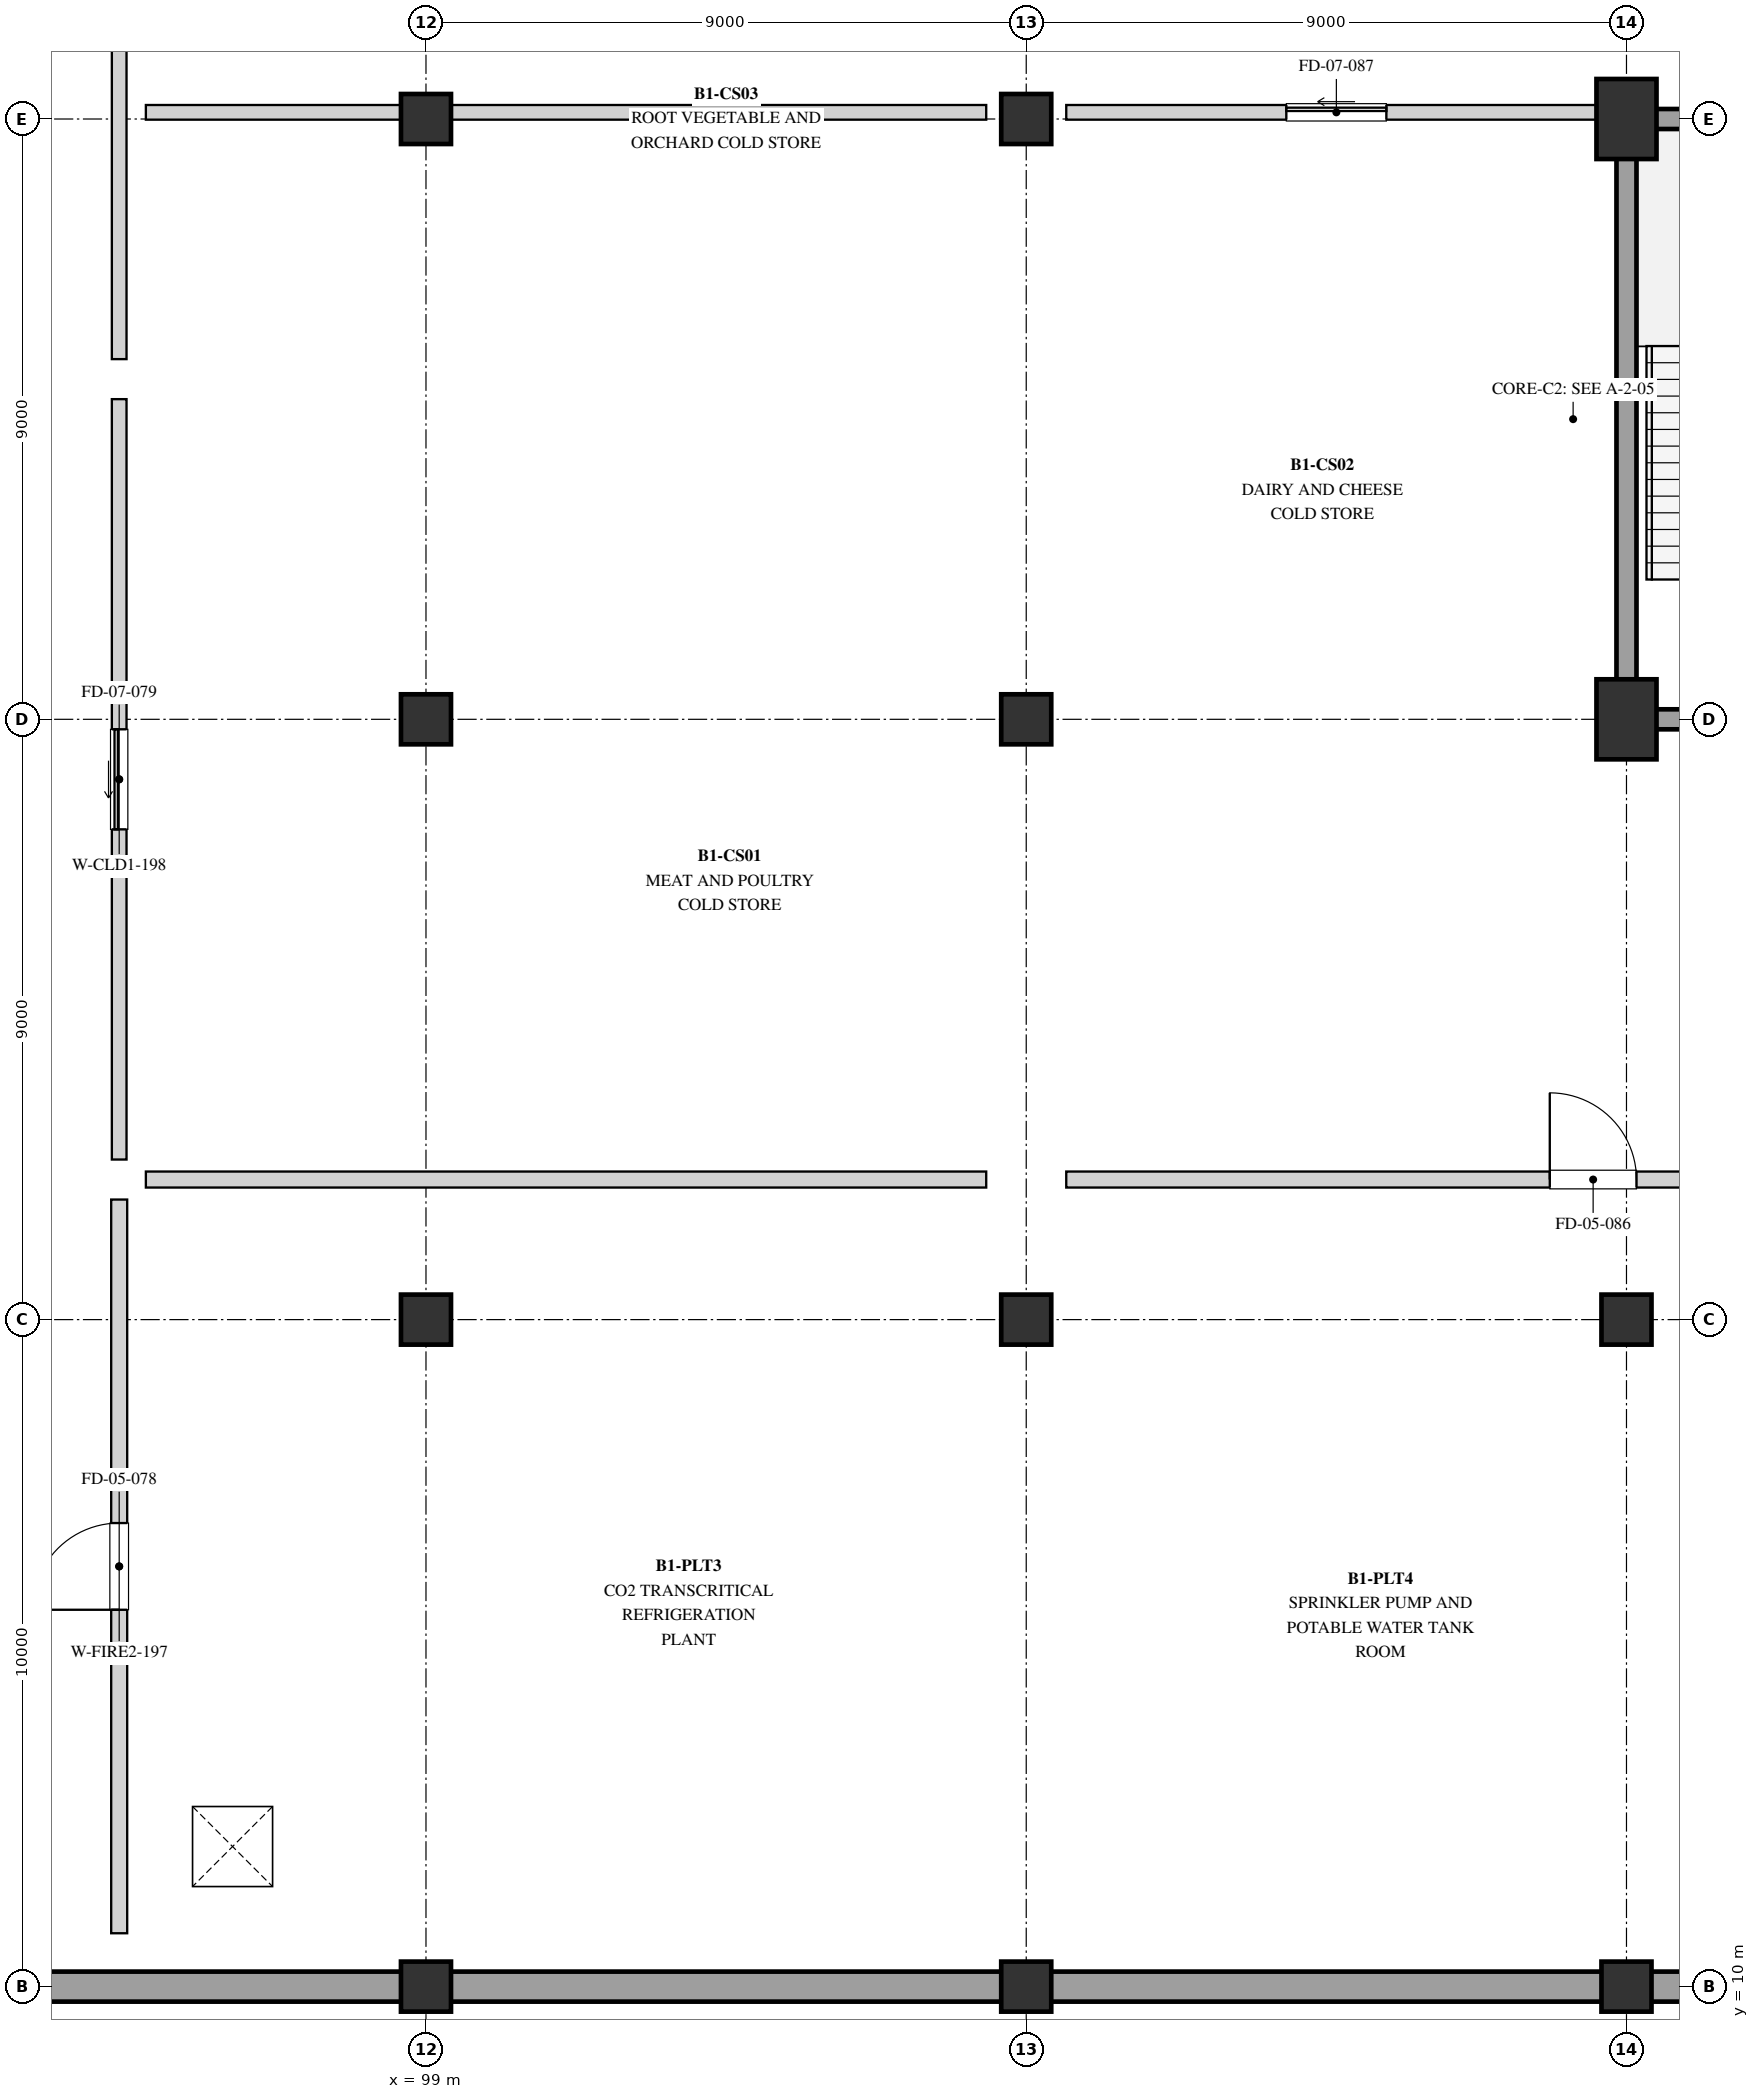
"""IFC4 building model, lengths in metres.
Left out: names, types, materials, properties, quantities, classifications, styles, units other than length and angle.
Written with IfcOpenShell. Run it as: python <this file> out.ifc"""

import sys

from ifc_helpers import new_model, si_unit, direction, frame, frame_2d, origin, origin_2d, place, context, subcontext, project, spatial, rectangle, extrude, element, fill, save


model = new_model("IFC4")
c1 = context("Model", 3, precision=1e-05, world=origin(), true_north=direction((0.0, 1.0)))
c2 = subcontext(c1, "Body", "Model", "MODEL_VIEW")
j1 = project(units=[si_unit("LENGTHUNIT", "METRE"), si_unit("PLANEANGLEUNIT", "RADIAN")], contexts=[c1])
p1 = place(None, origin())
s1 = spatial("IfcSite", under=j1, at=p1, CompositionType="ELEMENT")
p2 = place(p1, origin())
s2 = spatial("IfcBuilding", under=s1, at=p2, CompositionType="ELEMENT")
p3 = place(p2, frame((0.0, 0.0, -4.2)))
s3 = spatial("IfcBuildingStorey", under=s2, at=p3, CompositionType="ELEMENT", Elevation=-4.2)
for number, where, z_axis, x_axis in (
    (1, (99.0, 10.0, 0.0), (0.0, 0.0, 1.0), (1.0, 0.0, 0.0)),
    (2, (99.0, 20.0, 0.0), (0.0, 0.0, 1.0), (1.0, 0.0, 0.0)),
    (3, (99.0, 29.0, 0.0), (0.0, 0.0, 1.0), (1.0, 0.0, 0.0)),
):
    element("IfcColumn", number, at=place(p3, frame(where, z_axis=z_axis, x_axis=x_axis)), inside=s3, PredefinedType="COLUMN", context=c2, shape_type="SweptSolid", body=[
        extrude(rectangle(XDim=0.75, YDim=0.75, at=origin_2d()), origin(), (0.0, 0.0, 1.0), 4.2),
    ])
p4 = place(p3, frame((99.0, 38.0, 0.0), z_axis=(0.0, 0.0, 1.0), x_axis=(1.0, 0.0, 0.0)))
e4 = element("IfcColumn", 4, at=p4, inside=s3, PredefinedType="COLUMN", context=c2, shape_type="SweptSolid", body=[
    extrude(rectangle(XDim=0.75, YDim=0.75, at=origin_2d()), origin(), (0.0, 0.0, 1.0), 3.86),
])
for number, where, z_axis, x_axis in (
    (5, (108.0, 10.0, 0.0), (0.0, 0.0, 1.0), (1.0, 0.0, 0.0)),
    (6, (108.0, 20.0, 0.0), (0.0, 0.0, 1.0), (1.0, 0.0, 0.0)),
    (7, (108.0, 29.0, 0.0), (0.0, 0.0, 1.0), (1.0, 0.0, 0.0)),
    (8, (108.0, 38.0, 0.0), (0.0, 0.0, 1.0), (1.0, 0.0, 0.0)),
    (9, (117.0, 10.0, 0.0), (0.0, 0.0, 1.0), (1.0, 0.0, 0.0)),
    (10, (117.0, 20.0, 0.0), (0.0, 0.0, 1.0), (1.0, 0.0, 0.0)),
):
    element("IfcColumn", number, at=place(p3, frame(where, z_axis=z_axis, x_axis=x_axis)), inside=s3, PredefinedType="COLUMN", context=c2, shape_type="SweptSolid", body=[
        extrude(rectangle(XDim=0.75, YDim=0.75, at=origin_2d()), origin(), (0.0, 0.0, 1.0), 4.2),
    ])
for number, where, z_axis, x_axis in (
    (11, (117.0, 29.0, 0.0), (0.0, 0.0, 1.0), (1.0, 0.0, 0.0)),
    (12, (117.0, 38.0, 0.0), (0.0, 0.0, 1.0), (1.0, 0.0, 0.0)),
):
    element("IfcColumn", number, at=place(p3, frame(where, z_axis=z_axis, x_axis=x_axis)), inside=s3, PredefinedType="COLUMN", context=c2, shape_type="SweptSolid", body=[
        extrude(rectangle(XDim=0.9, YDim=1.2, at=origin_2d()), origin(), (0.0, 0.0, 1.0), 4.2),
    ])
for number, where, z_axis, x_axis in (
    (13, (90.0, 10.0, 0.0), (0.0, 0.0, 1.0), (1.0, 0.0, 0.0)),
    (14, (99.0, 10.0, 0.0), (0.0, 0.0, 1.0), (1.0, 0.0, 0.0)),
    (15, (108.0, 10.0, 0.0), (0.0, 0.0, 1.0), (1.0, 0.0, 0.0)),
):
    element("IfcWall", number, at=place(p3, frame(where, z_axis=z_axis, x_axis=x_axis)), inside=s3, PredefinedType="USERDEFINED", context=c2, shape_type="SweptSolid", body=[
        extrude(rectangle(XDim=9.0, YDim=0.45, at=frame_2d((4.5, 0.0))), origin(), (0.0, 0.0, 1.0), 3.82),
    ])
p5 = place(p3, frame((117.0, 10.0, 0.0), z_axis=(0.0, 0.0, 1.0), x_axis=(1.0, 0.0, 0.0)))
e16 = element("IfcWall", 16, at=p5, inside=s3, PredefinedType="USERDEFINED", context=c2, shape_type="SweptSolid", body=[
    extrude(rectangle(XDim=8.2, YDim=0.45, at=frame_2d((4.1, 0.0))), origin(), (0.0, 0.0, 1.0), 3.82),
])
p6 = place(p3, frame((117.0, 29.35, 0.0), z_axis=(0.0, 0.0, 1.0), x_axis=(0.0, 1.0, 0.0)))
e17 = element("IfcWall", 17, at=p6, inside=s3, PredefinedType="SHEAR", context=c2, shape_type="SweptSolid", body=[
    extrude(rectangle(XDim=8.3, YDim=0.3, at=frame_2d((4.15, 0.0))), origin(), (0.0, 0.0, 1.0), 3.82),
])
p7 = place(p3, frame((117.35, 29.0, 0.0), z_axis=(0.0, 0.0, 1.0), x_axis=(1.0, 0.0, 0.0)))
e18 = element("IfcWall", 18, at=p7, inside=s3, PredefinedType="SHEAR", context=c2, shape_type="SweptSolid", body=[
    extrude(rectangle(XDim=7.5, YDim=0.3, at=frame_2d((3.75, 0.0))), origin(), (0.0, 0.0, 1.0), 3.82),
])
p8 = place(p7, frame((5.1, 0.0, 0.0)))
e19 = element("IfcOpeningElement", 19, at=p8, cuts=e18, PredefinedType="OPENING", context=c2, shape_type="SweptSolid", body=[
    extrude(rectangle(XDim=1.1, YDim=2.1, at=frame_2d((0.55, 1.05))), frame((0.0, 0.16, 0.0), z_axis=(0.0, -1.0, 0.0), x_axis=(1.0, 0.0, 0.0)), (0.0, 0.0, 1.0), 0.32),
])
p9 = place(p3, frame((117.35, 38.0, 0.0), z_axis=(0.0, 0.0, 1.0), x_axis=(1.0, 0.0, 0.0)))
e20 = element("IfcWall", 20, at=p9, inside=s3, PredefinedType="SHEAR", context=c2, shape_type="SweptSolid", body=[
    extrude(rectangle(XDim=7.5, YDim=0.3, at=frame_2d((3.75, 0.0))), origin(), (0.0, 0.0, 1.0), 3.82),
])
p10 = place(p3, frame((94.4, 10.8, 0.0), z_axis=(0.0, 0.0, 1.0), x_axis=(0.0, 1.0, 0.0)))
e21 = element("IfcWall", 21, at=p10, inside=s3, PredefinedType="SOLIDWALL", context=c2, shape_type="SweptSolid", body=[
    extrude(rectangle(XDim=11.0, YDim=0.24, at=frame_2d((5.5, 0.0))), origin(), (0.0, 0.0, 1.0), 2.85),
])
p11 = place(p10, frame((4.85, 0.0, 0.0)))
e22 = element("IfcOpeningElement", 22, at=p11, cuts=e21, PredefinedType="OPENING", context=c2, shape_type="SweptSolid", body=[
    extrude(rectangle(XDim=1.3, YDim=2.2, at=frame_2d((0.65, 1.1))), frame((0.0, 0.13, 0.0), z_axis=(0.0, -1.0, 0.0), x_axis=(1.0, 0.0, 0.0)), (0.0, 0.0, 1.0), 0.26),
])
p12 = place(p3, frame((94.4, 22.4, 0.0), z_axis=(0.0, 0.0, 1.0), x_axis=(0.0, 1.0, 0.0)))
e23 = element("IfcWall", 23, at=p12, inside=s3, PredefinedType="PARTITIONING", context=c2, shape_type="SweptSolid", body=[
    extrude(rectangle(XDim=11.4, YDim=0.22, at=frame_2d((5.7, 0.0))), origin(), (0.0, 0.0, 1.0), 2.85),
])
p13 = place(p12, frame((4.95, 0.0, 0.0)))
e24 = element("IfcOpeningElement", 24, at=p13, cuts=e23, PredefinedType="OPENING", context=c2, shape_type="SweptSolid", body=[
    extrude(rectangle(XDim=1.5, YDim=2.3, at=frame_2d((0.75, 1.15))), frame((0.0, 0.12, 0.0), z_axis=(0.0, -1.0, 0.0), x_axis=(1.0, 0.0, 0.0)), (0.0, 0.0, 1.0), 0.24),
])
p14 = place(p3, frame((94.4, 34.4, 0.0), z_axis=(0.0, 0.0, 1.0), x_axis=(0.0, 1.0, 0.0)))
e25 = element("IfcWall", 25, at=p14, inside=s3, PredefinedType="PARTITIONING", context=c2, shape_type="SweptSolid", body=[
    extrude(rectangle(XDim=11.8, YDim=0.22, at=frame_2d((5.9, 0.0))), origin(), (0.0, 0.0, 1.0), 2.85),
])
p15 = place(p14, frame((5.15, 0.0, 0.0)))
e26 = element("IfcOpeningElement", 26, at=p15, cuts=e25, PredefinedType="OPENING", context=c2, shape_type="SweptSolid", body=[
    extrude(rectangle(XDim=1.5, YDim=2.3, at=frame_2d((0.75, 1.15))), frame((0.0, 0.12, 0.0), z_axis=(0.0, -1.0, 0.0), x_axis=(1.0, 0.0, 0.0)), (0.0, 0.0, 1.0), 0.24),
])
p16 = place(p3, frame((94.8, 22.1, 0.0), z_axis=(0.0, 0.0, 1.0), x_axis=(1.0, 0.0, 0.0)))
e27 = element("IfcWall", 27, at=p16, inside=s3, PredefinedType="SOLIDWALL", context=c2, shape_type="SweptSolid", body=[
    extrude(rectangle(XDim=12.6, YDim=0.24, at=frame_2d((6.3, 0.0))), origin(), (0.0, 0.0, 1.0), 2.85),
])
p17 = place(p3, frame((108.6, 22.1, 0.0), z_axis=(0.0, 0.0, 1.0), x_axis=(1.0, 0.0, 0.0)))
e28 = element("IfcWall", 28, at=p17, inside=s3, PredefinedType="SOLIDWALL", context=c2, shape_type="SweptSolid", body=[
    extrude(rectangle(XDim=15.8, YDim=0.24, at=frame_2d((7.9, 0.0))), origin(), (0.0, 0.0, 1.0), 2.85),
])
p18 = place(p17, frame((7.25, 0.0, 0.0)))
e29 = element("IfcOpeningElement", 29, at=p18, cuts=e28, PredefinedType="OPENING", context=c2, shape_type="SweptSolid", body=[
    extrude(rectangle(XDim=1.3, YDim=2.2, at=frame_2d((0.65, 1.1))), frame((0.0, 0.13, 0.0), z_axis=(0.0, -1.0, 0.0), x_axis=(1.0, 0.0, 0.0)), (0.0, 0.0, 1.0), 0.26),
])
p19 = place(p3, frame((94.8, 38.1, 0.0), z_axis=(0.0, 0.0, 1.0), x_axis=(1.0, 0.0, 0.0)))
e30 = element("IfcWall", 30, at=p19, inside=s3, PredefinedType="PARTITIONING", context=c2, shape_type="SweptSolid", body=[
    extrude(rectangle(XDim=12.6, YDim=0.22, at=frame_2d((6.3, 0.0))), origin(), (0.0, 0.0, 1.0), 2.85),
])
p20 = place(p3, frame((108.6, 38.1, 0.0), z_axis=(0.0, 0.0, 1.0), x_axis=(1.0, 0.0, 0.0)))
e31 = element("IfcWall", 31, at=p20, inside=s3, PredefinedType="PARTITIONING", context=c2, shape_type="SweptSolid", body=[
    extrude(rectangle(XDim=8.1, YDim=0.22, at=frame_2d((4.05, 0.0))), origin(), (0.0, 0.0, 1.0), 2.85),
])
p21 = place(p20, frame((3.3, 0.0, 0.0)))
e32 = element("IfcOpeningElement", 32, at=p21, cuts=e31, PredefinedType="OPENING", context=c2, shape_type="SweptSolid", body=[
    extrude(rectangle(XDim=1.5, YDim=2.3, at=frame_2d((0.75, 1.15))), frame((0.0, 0.12, 0.0), z_axis=(0.0, -1.0, 0.0), x_axis=(1.0, 0.0, 0.0)), (0.0, 0.0, 1.0), 0.24),
])
p22 = place(p11, origin())
e33 = element("IfcDoor", 33, at=p22, inside=s3, OperationType="SINGLE_SWING_LEFT", PredefinedType="DOOR", context=c2, shape_type="SweptSolid", body=[
    extrude(rectangle(XDim=1.3, YDim=2.2, at=frame_2d((0.65, 1.1))), frame((0.0, 0.025, 0.0), z_axis=(0.0, -1.0, 0.0), x_axis=(1.0, 0.0, 0.0)), (0.0, 0.0, 1.0), 0.05),
])
fill(e22, e33)
p23 = place(p13, origin())
e34 = element("IfcDoor", 34, at=p23, inside=s3, OperationType="SLIDING_TO_LEFT", PredefinedType="DOOR", context=c2, shape_type="SweptSolid", body=[
    extrude(rectangle(XDim=1.5, YDim=2.3, at=frame_2d((0.75, 1.15))), frame((0.0, 0.025, 0.0), z_axis=(0.0, -1.0, 0.0), x_axis=(1.0, 0.0, 0.0)), (0.0, 0.0, 1.0), 0.05),
])
fill(e24, e34)
p24 = place(p18, origin())
e35 = element("IfcDoor", 35, at=p24, inside=s3, OperationType="SINGLE_SWING_LEFT", PredefinedType="DOOR", context=c2, shape_type="SweptSolid", body=[
    extrude(rectangle(XDim=1.3, YDim=2.2, at=frame_2d((0.65, 1.1))), frame((0.0, 0.025, 0.0), z_axis=(0.0, -1.0, 0.0), x_axis=(1.0, 0.0, 0.0)), (0.0, 0.0, 1.0), 0.05),
])
fill(e29, e35)
p25 = place(p21, origin())
e36 = element("IfcDoor", 36, at=p25, inside=s3, OperationType="SLIDING_TO_LEFT", PredefinedType="DOOR", context=c2, shape_type="SweptSolid", body=[
    extrude(rectangle(XDim=1.5, YDim=2.3, at=frame_2d((0.75, 1.15))), frame((0.0, 0.025, 0.0), z_axis=(0.0, -1.0, 0.0), x_axis=(1.0, 0.0, 0.0)), (0.0, 0.0, 1.0), 0.05),
])
fill(e32, e36)
save(model, sys.argv[1])
